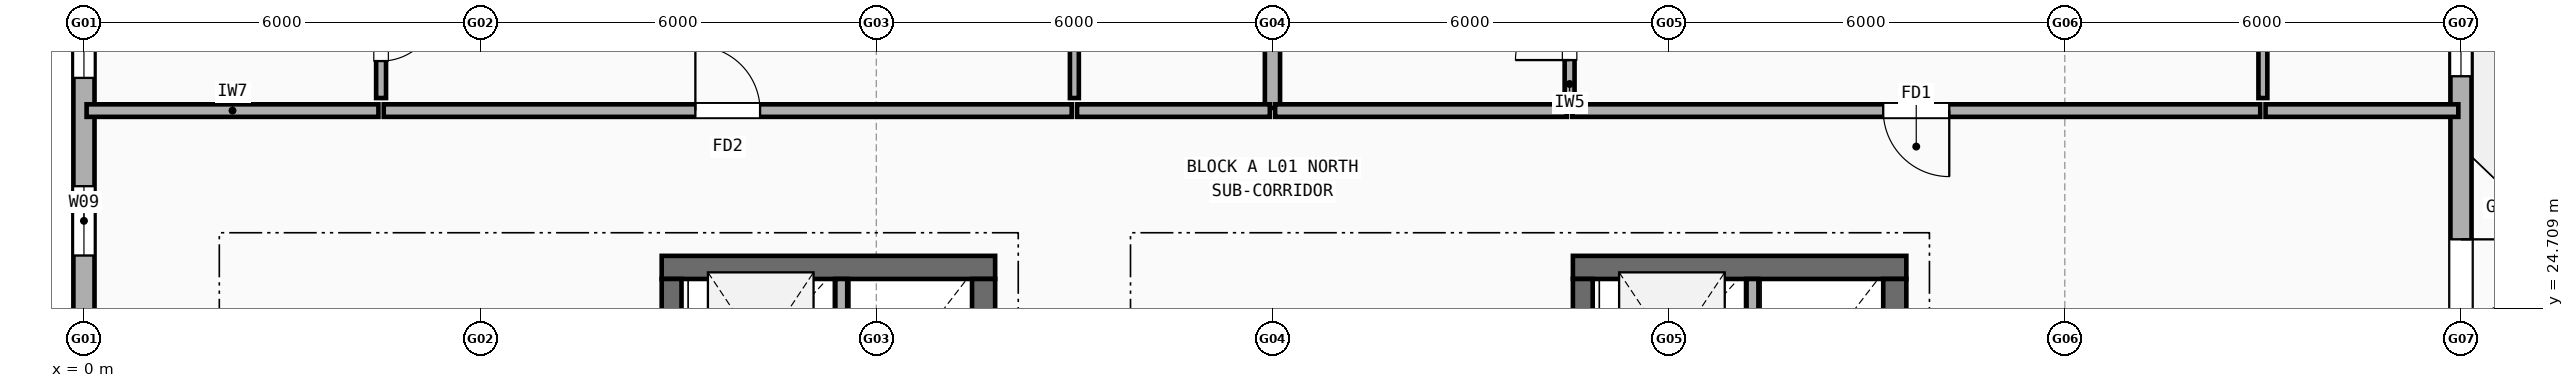
"""IFC4 building model, lengths in metres.
Left out: names, types, materials, properties, quantities, classifications, styles, units other than length and angle.
Written with IfcOpenShell. Run it as: python <this file> out.ifc"""

import sys

from ifc_helpers import new_model, si_unit, direction, frame, frame_2d, origin, place, context, subcontext, project, spatial, rectangle, extrude, element, fill, save


model = new_model("IFC4")
c1 = context("Model", 3, precision=1e-05, world=origin(), true_north=direction((0.0, 1.0)))
c2 = subcontext(c1, "Body", "Model", "MODEL_VIEW")
j1 = project(units=[si_unit("LENGTHUNIT", "METRE"), si_unit("PLANEANGLEUNIT", "RADIAN")], contexts=[c1])
p1 = place(None, origin())
s1 = spatial("IfcSite", under=j1, at=p1, CompositionType="ELEMENT")
p2 = place(p1, origin())
s2 = spatial("IfcBuilding", under=s1, at=p2, CompositionType="ELEMENT")
p3 = place(p2, frame((0.0, 0.0, 4.5)))
s3 = spatial("IfcBuildingStorey", under=s2, at=p3, CompositionType="ELEMENT", Elevation=4.5)
p4 = place(p3, frame((36.0, 24.4, 0.0), z_axis=(0.0, 0.0, 1.0), x_axis=(0.0, 1.0, 0.0)))
e1 = element("IfcWall", 1, at=p4, inside=s3, PredefinedType="STANDARD", context=c2, shape_type="SweptSolid", body=[
    extrude(rectangle(XDim=5.2, YDim=0.32, at=frame_2d((2.6, 0.0))), origin(), (0.0, 0.0, 1.0), 2.427),
])
p5 = place(p4, frame((0.2, 0.0, 0.0)))
e2 = element("IfcOpeningElement", 2, at=p5, cuts=e1, PredefinedType="OPENING", context=c2, shape_type="SweptSolid", body=[
    extrude(rectangle(XDim=1.15, YDim=2.15, at=frame_2d((0.575, 1.075))), frame((0.0, 0.17, 0.0), z_axis=(0.0, -1.0, 0.0), x_axis=(1.0, 0.0, 0.0)), (0.0, 0.0, 1.0), 0.34),
])
p6 = place(p4, frame((3.82, 0.0, 0.9)))
e3 = element("IfcOpeningElement", 3, at=p6, cuts=e1, PredefinedType="OPENING", context=c2, shape_type="SweptSolid", body=[
    extrude(rectangle(XDim=0.9, YDim=1.3, at=frame_2d((0.45, 0.65))), frame((0.0, 0.17, 0.0), z_axis=(0.0, -1.0, 0.0), x_axis=(1.0, 0.0, 0.0)), (0.0, 0.0, 1.0), 0.34),
])
p7 = place(p3, frame((0.0, 29.6, 0.0), z_axis=(0.0, 0.0, 1.0), x_axis=(0.0, -1.0, 0.0)))
e4 = element("IfcWall", 4, at=p7, inside=s3, PredefinedType="STANDARD", context=c2, shape_type="SweptSolid", body=[
    extrude(rectangle(XDim=5.2, YDim=0.32, at=frame_2d((2.6, 0.0))), origin(), (0.0, 0.0, 1.0), 2.427),
])
p8 = place(p7, frame((0.455, 0.0, 0.9)))
e5 = element("IfcOpeningElement", 5, at=p8, cuts=e4, PredefinedType="OPENING", context=c2, shape_type="SweptSolid", body=[
    extrude(rectangle(XDim=0.95, YDim=1.35, at=frame_2d((0.475, 0.675))), frame((0.0, 0.17, 0.0), z_axis=(0.0, -1.0, 0.0), x_axis=(1.0, 0.0, 0.0)), (0.0, 0.0, 1.0), 0.34),
])
p9 = place(p7, frame((3.045, 0.0, 0.9)))
e6 = element("IfcOpeningElement", 6, at=p9, cuts=e4, PredefinedType="OPENING", context=c2, shape_type="SweptSolid", body=[
    extrude(rectangle(XDim=1.05, YDim=1.35, at=frame_2d((0.525, 0.675))), frame((0.0, 0.17, 0.0), z_axis=(0.0, -1.0, 0.0), x_axis=(1.0, 0.0, 0.0)), (0.0, 0.0, 1.0), 0.34),
])
p10 = place(p3, frame((13.8, 25.325, 0.0), z_axis=(0.0, 0.0, 1.0), x_axis=(-1.0, 0.0, 0.0)))
e7 = element("IfcWall", 7, at=p10, inside=s3, PredefinedType="SHEAR", context=c2, shape_type="SweptSolid", body=[
    extrude(rectangle(XDim=5.05, YDim=0.35, at=frame_2d((2.525, 0.0))), origin(), (0.0, 0.0, 1.0), 2.945),
])
p11 = place(p3, frame((13.625, 18.75, 0.0), z_axis=(0.0, 0.0, 1.0), x_axis=(0.0, 1.0, 0.0)))
e8 = element("IfcWall", 8, at=p11, inside=s3, PredefinedType="SHEAR", context=c2, shape_type="SweptSolid", body=[
    extrude(rectangle(XDim=6.4, YDim=0.35, at=frame_2d((3.2, 0.0))), origin(), (0.0, 0.0, 1.0), 2.945),
])
p12 = place(p3, frame((8.9, 21.8, 0.0), z_axis=(0.0, 0.0, 1.0), x_axis=(0.0, 1.0, 0.0)))
e9 = element("IfcWall", 9, at=p12, inside=s3, PredefinedType="SHEAR", context=c2, shape_type="SweptSolid", body=[
    extrude(rectangle(XDim=3.35, YDim=0.3, at=frame_2d((1.675, 0.0))), origin(), (0.0, 0.0, 1.0), 2.945),
])
p13 = place(p3, frame((11.47, 22.94, 0.0), z_axis=(0.0, 0.0, 1.0), x_axis=(0.0, 1.0, 0.0)))
e10 = element("IfcWall", 10, at=p13, inside=s3, PredefinedType="SOLIDWALL", context=c2, shape_type="SweptSolid", body=[
    extrude(rectangle(XDim=2.21, YDim=0.18, at=frame_2d((1.105, 0.0))), origin(), (0.0, 0.0, 1.0), 2.945),
])
p14 = place(p3, frame((27.6, 25.325, 0.0), z_axis=(0.0, 0.0, 1.0), x_axis=(-1.0, 0.0, 0.0)))
e11 = element("IfcWall", 11, at=p14, inside=s3, PredefinedType="SHEAR", context=c2, shape_type="SweptSolid", body=[
    extrude(rectangle(XDim=5.05, YDim=0.35, at=frame_2d((2.525, 0.0))), origin(), (0.0, 0.0, 1.0), 2.945),
])
p15 = place(p3, frame((27.425, 18.75, 0.0), z_axis=(0.0, 0.0, 1.0), x_axis=(0.0, 1.0, 0.0)))
e12 = element("IfcWall", 12, at=p15, inside=s3, PredefinedType="SHEAR", context=c2, shape_type="SweptSolid", body=[
    extrude(rectangle(XDim=6.4, YDim=0.35, at=frame_2d((3.2, 0.0))), origin(), (0.0, 0.0, 1.0), 2.945),
])
p16 = place(p3, frame((22.7, 21.8, 0.0), z_axis=(0.0, 0.0, 1.0), x_axis=(0.0, 1.0, 0.0)))
e13 = element("IfcWall", 13, at=p16, inside=s3, PredefinedType="SHEAR", context=c2, shape_type="SweptSolid", body=[
    extrude(rectangle(XDim=3.35, YDim=0.3, at=frame_2d((1.675, 0.0))), origin(), (0.0, 0.0, 1.0), 2.945),
])
p17 = place(p3, frame((25.27, 22.94, 0.0), z_axis=(0.0, 0.0, 1.0), x_axis=(0.0, 1.0, 0.0)))
e14 = element("IfcWall", 14, at=p17, inside=s3, PredefinedType="SOLIDWALL", context=c2, shape_type="SweptSolid", body=[
    extrude(rectangle(XDim=2.21, YDim=0.18, at=frame_2d((1.105, 0.0))), origin(), (0.0, 0.0, 1.0), 2.945),
])
p18 = place(p3, frame((18.0, 27.74, 0.0), z_axis=(0.0, 0.0, 1.0), x_axis=(0.0, 1.0, 0.0)))
e15 = element("IfcWall", 15, at=p18, inside=s3, PredefinedType="SOLIDWALL", context=c2, shape_type="SweptSolid", body=[
    extrude(rectangle(XDim=13.87, YDim=0.23, at=frame_2d((6.935, 0.0))), origin(), (0.0, 0.0, 1.0), 2.327),
])
p19 = place(p3, frame((0.04, 27.7, 0.0), z_axis=(0.0, 0.0, 1.0), x_axis=(1.0, 0.0, 0.0)))
e16 = element("IfcWall", 16, at=p19, inside=s3, PredefinedType="SOLIDWALL", context=c2, shape_type="SweptSolid", body=[
    extrude(rectangle(XDim=4.42, YDim=0.19, at=frame_2d((2.21, 0.0))), origin(), (0.0, 0.0, 1.0), 2.427),
])
p20 = place(p3, frame((4.54, 27.7, 0.0), z_axis=(0.0, 0.0, 1.0), x_axis=(1.0, 0.0, 0.0)))
e17 = element("IfcWall", 17, at=p20, inside=s3, PredefinedType="SOLIDWALL", context=c2, shape_type="SweptSolid", body=[
    extrude(rectangle(XDim=10.42, YDim=0.19, at=frame_2d((5.21, 0.0))), origin(), (0.0, 0.0, 1.0), 2.508),
])
p21 = place(p20, frame((4.72, 0.0, 0.0)))
e18 = element("IfcOpeningElement", 18, at=p21, cuts=e17, PredefinedType="OPENING", context=c2, shape_type="SweptSolid", body=[
    extrude(rectangle(XDim=0.98, YDim=2.15, at=frame_2d((0.49, 1.075))), frame((0.0, 0.105, 0.0), z_axis=(0.0, -1.0, 0.0), x_axis=(1.0, 0.0, 0.0)), (0.0, 0.0, 1.0), 0.21),
])
p22 = place(p3, frame((4.5, 27.89, 0.0), z_axis=(0.0, 0.0, 1.0), x_axis=(0.0, 1.0, 0.0)))
e19 = element("IfcWall", 19, at=p22, inside=s3, PredefinedType="PARTITIONING", context=c2, shape_type="SweptSolid", body=[
    extrude(rectangle(XDim=1.97, YDim=0.15, at=frame_2d((0.985, 0.0))), origin(), (0.0, 0.0, 1.0), 2.945),
])
p23 = place(p22, frame((0.56, 0.0, 0.0)))
e20 = element("IfcOpeningElement", 20, at=p23, cuts=e19, PredefinedType="OPENING", context=c2, shape_type="SweptSolid", body=[
    extrude(rectangle(XDim=0.85, YDim=2.1, at=frame_2d((0.425, 1.05))), frame((0.0, 0.085, 0.0), z_axis=(0.0, -1.0, 0.0), x_axis=(1.0, 0.0, 0.0)), (0.0, 0.0, 1.0), 0.17),
])
p24 = place(p3, frame((15.04, 27.7, 0.0), z_axis=(0.0, 0.0, 1.0), x_axis=(1.0, 0.0, 0.0)))
e21 = element("IfcWall", 21, at=p24, inside=s3, PredefinedType="SOLIDWALL", context=c2, shape_type="SweptSolid", body=[
    extrude(rectangle(XDim=2.92, YDim=0.19, at=frame_2d((1.46, 0.0))), origin(), (0.0, 0.0, 1.0), 2.945),
])
p25 = place(p3, frame((15.0, 27.89, 0.0), z_axis=(0.0, 0.0, 1.0), x_axis=(0.0, 1.0, 0.0)))
e22 = element("IfcWall", 22, at=p25, inside=s3, PredefinedType="PARTITIONING", context=c2, shape_type="SweptSolid", body=[
    extrude(rectangle(XDim=13.92, YDim=0.135, at=frame_2d((6.96, 0.0))), origin(), (0.0, 0.0, 1.0), 2.427),
])
p26 = place(p25, frame((6.65, 0.0, 0.0)))
e23 = element("IfcOpeningElement", 23, at=p26, cuts=e22, PredefinedType="OPENING", context=c2, shape_type="SweptSolid", body=[
    extrude(rectangle(XDim=0.88, YDim=2.1, at=frame_2d((0.44, 1.05))), frame((0.0, 0.077, 0.0), z_axis=(0.0, -1.0, 0.0), x_axis=(1.0, 0.0, 0.0)), (0.0, 0.0, 1.0), 0.155),
])
p27 = place(p3, frame((18.04, 27.7, 0.0), z_axis=(0.0, 0.0, 1.0), x_axis=(1.0, 0.0, 0.0)))
e24 = element("IfcWall", 24, at=p27, inside=s3, PredefinedType="SOLIDWALL", context=c2, shape_type="SweptSolid", body=[
    extrude(rectangle(XDim=4.42, YDim=0.19, at=frame_2d((2.21, 0.0))), origin(), (0.0, 0.0, 1.0), 2.945),
])
p28 = place(p3, frame((22.54, 27.7, 0.0), z_axis=(0.0, 0.0, 1.0), x_axis=(1.0, 0.0, 0.0)))
e25 = element("IfcWall", 25, at=p28, inside=s3, PredefinedType="SOLIDWALL", context=c2, shape_type="SweptSolid", body=[
    extrude(rectangle(XDim=10.42, YDim=0.19, at=frame_2d((5.21, 0.0))), origin(), (0.0, 0.0, 1.0), 2.427),
])
p29 = place(p28, frame((4.71, 0.0, 0.0)))
e26 = element("IfcOpeningElement", 26, at=p29, cuts=e25, PredefinedType="OPENING", context=c2, shape_type="SweptSolid", body=[
    extrude(rectangle(XDim=1.0, YDim=2.15, at=frame_2d((0.5, 1.075))), frame((0.0, 0.105, 0.0), z_axis=(0.0, -1.0, 0.0), x_axis=(1.0, 0.0, 0.0)), (0.0, 0.0, 1.0), 0.21),
])
p30 = place(p3, frame((22.5, 27.89, 0.0), z_axis=(0.0, 0.0, 1.0), x_axis=(0.0, 1.0, 0.0)))
e27 = element("IfcWall", 27, at=p30, inside=s3, PredefinedType="PARTITIONING", context=c2, shape_type="SweptSolid", body=[
    extrude(rectangle(XDim=1.97, YDim=0.15, at=frame_2d((0.985, 0.0))), origin(), (0.0, 0.0, 1.0), 2.945),
])
p31 = place(p30, frame((0.575, 0.0, 0.0)))
e28 = element("IfcOpeningElement", 28, at=p31, cuts=e27, PredefinedType="OPENING", context=c2, shape_type="SweptSolid", body=[
    extrude(rectangle(XDim=0.82, YDim=2.08, at=frame_2d((0.41, 1.04))), frame((0.0, 0.085, 0.0), z_axis=(0.0, -1.0, 0.0), x_axis=(1.0, 0.0, 0.0)), (0.0, 0.0, 1.0), 0.17),
])
p32 = place(p3, frame((33.04, 27.7, 0.0), z_axis=(0.0, 0.0, 1.0), x_axis=(1.0, 0.0, 0.0)))
e29 = element("IfcWall", 29, at=p32, inside=s3, PredefinedType="SOLIDWALL", context=c2, shape_type="SweptSolid", body=[
    extrude(rectangle(XDim=2.92, YDim=0.19, at=frame_2d((1.46, 0.0))), origin(), (0.0, 0.0, 1.0), 2.427),
])
p33 = place(p3, frame((33.0, 27.89, 0.0), z_axis=(0.0, 0.0, 1.0), x_axis=(0.0, 1.0, 0.0)))
e30 = element("IfcWall", 30, at=p33, inside=s3, PredefinedType="PARTITIONING", context=c2, shape_type="SweptSolid", body=[
    extrude(rectangle(XDim=13.92, YDim=0.135, at=frame_2d((6.96, 0.0))), origin(), (0.0, 0.0, 1.0), 2.427),
])
p34 = place(p33, frame((6.65, 0.0, 0.0)))
e31 = element("IfcOpeningElement", 31, at=p34, cuts=e30, PredefinedType="OPENING", context=c2, shape_type="SweptSolid", body=[
    extrude(rectangle(XDim=0.9, YDim=2.1, at=frame_2d((0.45, 1.05))), frame((0.0, 0.077, 0.0), z_axis=(0.0, -1.0, 0.0), x_axis=(1.0, 0.0, 0.0)), (0.0, 0.0, 1.0), 0.155),
])
p35 = place(p5, frame((1.15, 0.0, 0.0), z_axis=(0.0, 0.0, 1.0), x_axis=(-1.0, 0.0, 0.0)))
e32 = element("IfcDoor", 32, at=p35, inside=s3, OperationType="SINGLE_SWING_RIGHT", PredefinedType="DOOR", context=c2, shape_type="SweptSolid", body=[
    extrude(rectangle(XDim=1.15, YDim=2.15, at=frame_2d((0.575, 1.075))), frame((0.0, 0.025, 0.0), z_axis=(0.0, -1.0, 0.0), x_axis=(1.0, 0.0, 0.0)), (0.0, 0.0, 1.0), 0.05),
])
fill(e2, e32)
p36 = place(p6, origin())
e33 = element("IfcWindow", 33, at=p36, inside=s3, PartitioningType="SINGLE_PANEL", PredefinedType="WINDOW", context=c2, shape_type="SweptSolid", body=[
    extrude(rectangle(XDim=0.9, YDim=1.3, at=frame_2d((0.45, 0.65))), frame((0.0, 0.03, 0.0), z_axis=(0.0, -1.0, 0.0), x_axis=(1.0, 0.0, 0.0)), (0.0, 0.0, 1.0), 0.06),
])
fill(e3, e33)
p37 = place(p8, origin())
e34 = element("IfcWindow", 34, at=p37, inside=s3, PartitioningType="SINGLE_PANEL", PredefinedType="WINDOW", context=c2, shape_type="SweptSolid", body=[
    extrude(rectangle(XDim=0.95, YDim=1.35, at=frame_2d((0.475, 0.675))), frame((0.0, 0.03, 0.0), z_axis=(0.0, -1.0, 0.0), x_axis=(1.0, 0.0, 0.0)), (0.0, 0.0, 1.0), 0.06),
])
fill(e5, e34)
p38 = place(p9, origin())
e35 = element("IfcWindow", 35, at=p38, inside=s3, PartitioningType="SINGLE_PANEL", PredefinedType="WINDOW", context=c2, shape_type="SweptSolid", body=[
    extrude(rectangle(XDim=1.05, YDim=1.35, at=frame_2d((0.525, 0.675))), frame((0.0, 0.03, 0.0), z_axis=(0.0, -1.0, 0.0), x_axis=(1.0, 0.0, 0.0)), (0.0, 0.0, 1.0), 0.06),
])
fill(e6, e35)
p39 = place(p21, origin())
e36 = element("IfcDoor", 36, at=p39, inside=s3, OperationType="SINGLE_SWING_LEFT", PredefinedType="DOOR", context=c2, shape_type="SweptSolid", body=[
    extrude(rectangle(XDim=0.98, YDim=2.15, at=frame_2d((0.49, 1.075))), frame((0.0, 0.025, 0.0), z_axis=(0.0, -1.0, 0.0), x_axis=(1.0, 0.0, 0.0)), (0.0, 0.0, 1.0), 0.05),
])
fill(e18, e36)
p40 = place(p23, origin())
e37 = element("IfcDoor", 37, at=p40, inside=s3, OperationType="SINGLE_SWING_RIGHT", PredefinedType="DOOR", context=c2, shape_type="SweptSolid", body=[
    extrude(rectangle(XDim=0.85, YDim=2.1, at=frame_2d((0.425, 1.05))), frame((0.0, 0.025, 0.0), z_axis=(0.0, -1.0, 0.0), x_axis=(1.0, 0.0, 0.0)), (0.0, 0.0, 1.0), 0.05),
])
fill(e20, e37)
p41 = place(p29, origin())
e38 = element("IfcDoor", 38, at=p41, inside=s3, OperationType="SINGLE_SWING_RIGHT", PredefinedType="DOOR", context=c2, shape_type="SweptSolid", body=[
    extrude(rectangle(XDim=1.0, YDim=2.15, at=frame_2d((0.5, 1.075))), frame((0.0, 0.025, 0.0), z_axis=(0.0, -1.0, 0.0), x_axis=(1.0, 0.0, 0.0)), (0.0, 0.0, 1.0), 0.05),
])
fill(e26, e38)
p42 = place(p31, origin())
e39 = element("IfcDoor", 39, at=p42, inside=s3, OperationType="SINGLE_SWING_LEFT", PredefinedType="DOOR", context=c2, shape_type="SweptSolid", body=[
    extrude(rectangle(XDim=0.82, YDim=2.08, at=frame_2d((0.41, 1.04))), frame((0.0, 0.025, 0.0), z_axis=(0.0, -1.0, 0.0), x_axis=(1.0, 0.0, 0.0)), (0.0, 0.0, 1.0), 0.05),
])
fill(e28, e39)
save(model, sys.argv[1])
